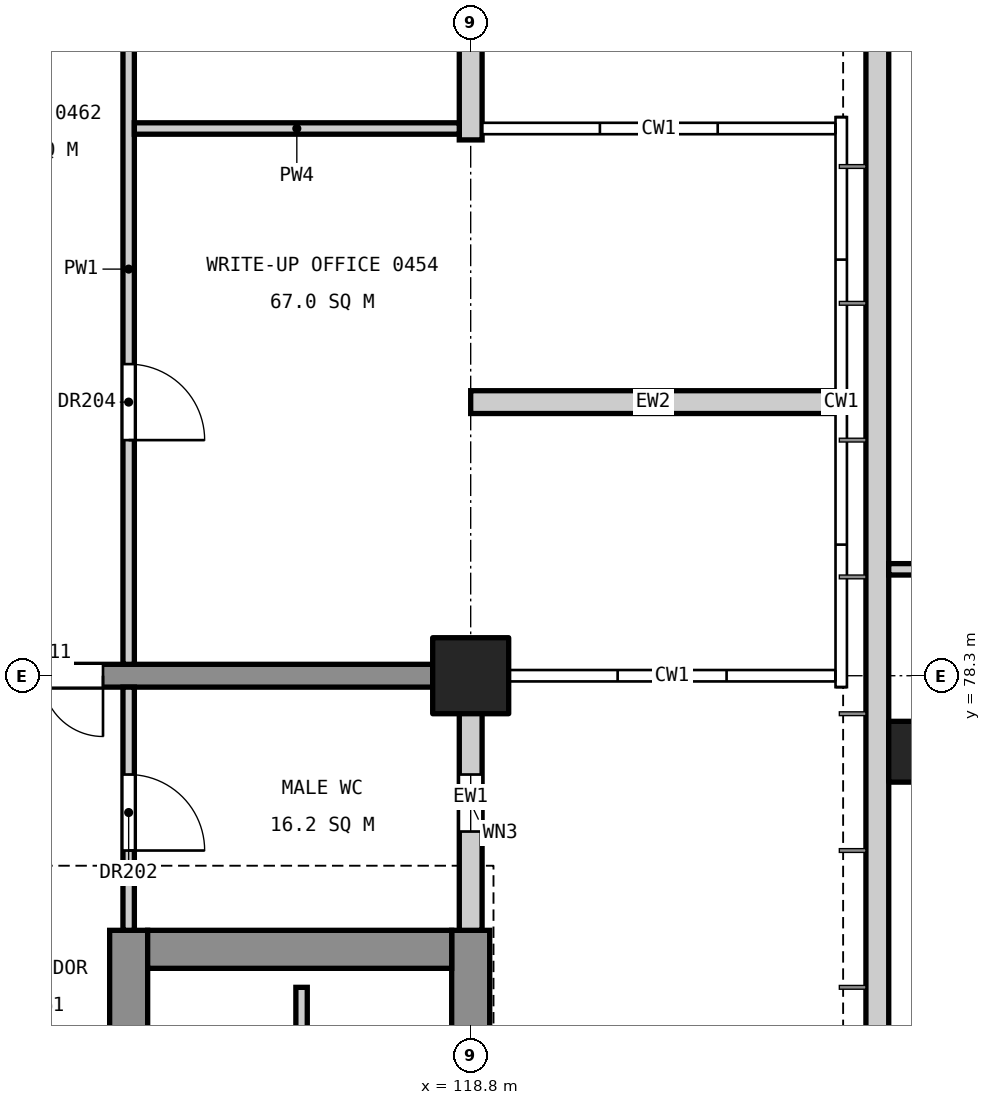
"""IFC4 building model, lengths in metres.
Left out: names, types, materials, properties, quantities, classifications, styles, units other than length and angle.
Written with IfcOpenShell. Run it as: python <this file> out.ifc"""

import sys

from ifc_helpers import new_model, si_unit, direction, frame, frame_2d, origin, origin_2d, place, context, subcontext, project, spatial, rectangle, extrude, element, fill, save


model = new_model("IFC4")
c1 = context("Model", 3, precision=1e-05, world=origin(), true_north=direction((0.0, 1.0)))
c2 = subcontext(c1, "Body", "Model", "MODEL_VIEW")
j1 = project(units=[si_unit("LENGTHUNIT", "METRE"), si_unit("PLANEANGLEUNIT", "RADIAN")], contexts=[c1])
p1 = place(None, origin())
s1 = spatial("IfcSite", under=j1, at=p1, CompositionType="ELEMENT")
p2 = place(p1, origin())
s2 = spatial("IfcBuilding", under=s1, at=p2, CompositionType="ELEMENT")
p3 = place(p2, frame((0.0, 0.0, 22.2)))
s3 = spatial("IfcBuildingStorey", under=s2, at=p3, CompositionType="ELEMENT", Elevation=22.2)
p4 = place(p3, frame((118.8, 78.3, 0.0), z_axis=(0.0, 0.0, 1.0), x_axis=(1.0, 0.0, 0.0)))
e1 = element("IfcColumn", 1, at=p4, inside=s3, PredefinedType="COLUMN", context=c2, shape_type="SweptSolid", body=[
    extrude(rectangle(XDim=1.0, YDim=1.0, at=origin_2d()), origin(), (0.0, 0.0, 1.0), 4.8),
])
p5 = place(p3, frame((118.8, 60.05, 0.0), z_axis=(0.0, 0.0, 1.0), x_axis=(0.0, 1.0, 0.0)))
e2 = element("IfcWall", 2, at=p5, inside=s3, PredefinedType="SHEAR", context=c2, shape_type="SweptSolid", body=[
    extrude(rectangle(XDim=14.9, YDim=0.5, at=frame_2d((7.45, 0.0))), origin(), (0.0, 0.0, 1.0), 4.55),
])
p6 = place(p5, frame((6.16, 0.0, 3.4)))
e3 = element("IfcOpeningElement", 3, at=p6, cuts=e2, PredefinedType="OPENING", context=c2, shape_type="SweptSolid", body=[
    extrude(rectangle(XDim=1.2, YDim=0.9, at=frame_2d((0.6, 0.45))), frame((0.0, 0.26, 0.0), z_axis=(0.0, -1.0, 0.0), x_axis=(1.0, 0.0, 0.0)), (0.0, 0.0, 1.0), 0.52),
])
p7 = place(p3, frame((114.3, 60.05, 0.0), z_axis=(0.0, 0.0, 1.0), x_axis=(0.0, 1.0, 0.0)))
e4 = element("IfcWall", 4, at=p7, inside=s3, PredefinedType="SHEAR", context=c2, shape_type="SweptSolid", body=[
    extrude(rectangle(XDim=14.9, YDim=0.5, at=frame_2d((7.45, 0.0))), origin(), (0.0, 0.0, 1.0), 4.55),
])
p8 = place(p7, frame((0.55, 0.0, 0.0)))
e5 = element("IfcOpeningElement", 5, at=p8, cuts=e4, PredefinedType="OPENING", context=c2, shape_type="SweptSolid", body=[
    extrude(rectangle(XDim=1.4, YDim=2.1, at=frame_2d((0.7, 1.05))), frame((0.0, 0.26, 0.0), z_axis=(0.0, -1.0, 0.0), x_axis=(1.0, 0.0, 0.0)), (0.0, 0.0, 1.0), 0.52),
])
p9 = place(p7, frame((8.85, 0.0, 0.0)))
e6 = element("IfcOpeningElement", 6, at=p9, cuts=e4, PredefinedType="OPENING", context=c2, shape_type="SweptSolid", body=[
    extrude(rectangle(XDim=1.1, YDim=2.1, at=frame_2d((0.55, 1.05))), frame((0.0, 0.26, 0.0), z_axis=(0.0, -1.0, 0.0), x_axis=(1.0, 0.0, 0.0)), (0.0, 0.0, 1.0), 0.52),
])
p10 = place(p7, frame((11.4, 0.0, 0.0)))
e7 = element("IfcOpeningElement", 7, at=p10, cuts=e4, PredefinedType="OPENING", context=c2, shape_type="SweptSolid", body=[
    extrude(rectangle(XDim=1.1, YDim=2.1, at=frame_2d((0.55, 1.05))), frame((0.0, 0.26, 0.0), z_axis=(0.0, -1.0, 0.0), x_axis=(1.0, 0.0, 0.0)), (0.0, 0.0, 1.0), 0.52),
])
p11 = place(p3, frame((118.55, 74.7, 0.0), z_axis=(0.0, 0.0, 1.0), x_axis=(-1.0, 0.0, 0.0)))
e8 = element("IfcWall", 8, at=p11, inside=s3, PredefinedType="SHEAR", context=c2, shape_type="SweptSolid", body=[
    extrude(rectangle(XDim=4.0, YDim=0.5, at=frame_2d((2.0, 0.0))), origin(), (0.0, 0.0, 1.0), 4.55),
])
p12 = place(p3, frame((118.3, 78.3, 0.0), z_axis=(0.0, 0.0, 1.0), x_axis=(-1.0, 0.0, 0.0)))
e9 = element("IfcWall", 9, at=p12, inside=s3, PredefinedType="SHEAR", context=c2, shape_type="SweptSolid", body=[
    extrude(rectangle(XDim=6.2, YDim=0.3, at=frame_2d((3.1, 0.0))), origin(), (0.0, 0.0, 1.0), 4.55),
])
p13 = place(p12, frame((4.337, 0.0, 0.0)))
e10 = element("IfcOpeningElement", 10, at=p13, cuts=e9, PredefinedType="OPENING", context=c2, shape_type="SweptSolid", body=[
    extrude(rectangle(XDim=1.6, YDim=2.1, at=frame_2d((0.8, 1.05))), frame((0.0, 0.16, 0.0), z_axis=(0.0, -1.0, 0.0), x_axis=(1.0, 0.0, 0.0)), (0.0, 0.0, 1.0), 0.32),
])
p14 = place(p3, frame((124.7, 77.3, 0.0), z_axis=(0.0, 0.0, 1.0), x_axis=(1.0, 0.0, 0.0)))
e11 = element("IfcColumn", 11, at=p14, inside=s3, PredefinedType="COLUMN", context=c2, shape_type="SweptSolid", body=[
    extrude(rectangle(XDim=0.8, YDim=0.8, at=origin_2d()), origin(), (0.0, 0.0, 1.0), 4.8),
])
p15 = place(p3, frame((124.15, 70.3, 0.0), z_axis=(0.0, 0.0, 1.0), x_axis=(0.0, 1.0, 0.0)))
e12 = element("IfcWall", 12, at=p15, inside=s3, PredefinedType="SOLIDWALL", context=c2, shape_type="SweptSolid", body=[
    extrude(rectangle(XDim=36.5, YDim=0.3, at=frame_2d((18.25, 0.0))), origin(), (0.0, 0.0, 1.0), 4.35),
])
p16 = place(p3, frame((124.3, 77.3, 0.0), z_axis=(0.0, 0.0, 1.0), x_axis=(1.0, 0.0, 0.0)))
e13 = element("IfcWall", 13, at=p16, inside=s3, PredefinedType="SOLIDWALL", context=c2, shape_type="SweptSolid", body=[
    extrude(rectangle(XDim=14.275, YDim=0.25, at=frame_2d((7.137, 0.0))), origin(), (0.0, 0.0, 1.0), 4.35),
])
p17 = place(p16, frame((2.55, 0.0, 0.0)))
e14 = element("IfcOpeningElement", 14, at=p17, cuts=e13, PredefinedType="OPENING", context=c2, shape_type="SweptSolid", body=[
    extrude(rectangle(XDim=0.9, YDim=2.1, at=frame_2d((0.45, 1.05))), frame((0.0, 0.135, 0.0), z_axis=(0.0, -1.0, 0.0), x_axis=(1.0, 0.0, 0.0)), (0.0, 0.0, 1.0), 0.27),
])
p18 = place(p16, frame((7.6, 0.0, 0.0)))
e15 = element("IfcOpeningElement", 15, at=p18, cuts=e13, PredefinedType="OPENING", context=c2, shape_type="SweptSolid", body=[
    extrude(rectangle(XDim=0.9, YDim=2.1, at=frame_2d((0.45, 1.05))), frame((0.0, 0.135, 0.0), z_axis=(0.0, -1.0, 0.0), x_axis=(1.0, 0.0, 0.0)), (0.0, 0.0, 1.0), 0.27),
])
p19 = place(p16, frame((11.65, 0.0, 0.0)))
e16 = element("IfcOpeningElement", 16, at=p19, cuts=e13, PredefinedType="OPENING", context=c2, shape_type="SweptSolid", body=[
    extrude(rectangle(XDim=1.2, YDim=2.1, at=frame_2d((0.6, 1.05))), frame((0.0, 0.135, 0.0), z_axis=(0.0, -1.0, 0.0), x_axis=(1.0, 0.0, 0.0)), (0.0, 0.0, 1.0), 0.27),
])
p20 = place(p3, frame((124.3, 79.7, 0.0), z_axis=(0.0, 0.0, 1.0), x_axis=(1.0, 0.0, 0.0)))
e17 = element("IfcWall", 17, at=p20, inside=s3, PredefinedType="SOLIDWALL", context=c2, shape_type="SweptSolid", body=[
    extrude(rectangle(XDim=13.025, YDim=0.15, at=frame_2d((6.512, 0.0))), origin(), (0.0, 0.0, 1.0), 4.35),
])
p21 = place(p3, frame((116.575, 73.3, 0.0), z_axis=(0.0, 0.0, 1.0), x_axis=(0.0, 1.0, 0.0)))
e18 = element("IfcWall", 18, at=p21, inside=s3, PredefinedType="SOLIDWALL", context=c2, shape_type="SweptSolid", body=[
    extrude(rectangle(XDim=0.9, YDim=0.15, at=frame_2d((0.45, 0.0))), origin(), (0.0, 0.0, 1.0), 4.8),
])
p22 = place(p3, frame((118.8, 74.95, 0.0), z_axis=(0.0, 0.0, 1.0), x_axis=(0.0, 1.0, 0.0)))
e19 = element("IfcWall", 19, at=p22, inside=s3, PredefinedType="STANDARD", context=c2, shape_type="SweptSolid", body=[
    extrude(rectangle(XDim=3.5, YDim=0.3, at=frame_2d((1.75, 0.0))), origin(), (0.0, 0.0, 1.0), 3.65),
])
p23 = place(p22, frame((1.3, 0.0, 0.8)))
e20 = element("IfcOpeningElement", 20, at=p23, cuts=e19, PredefinedType="OPENING", context=c2, shape_type="SweptSolid", body=[
    extrude(rectangle(XDim=0.75, YDim=1.2, at=frame_2d((0.375, 0.6))), frame((0.0, 0.16, 0.0), z_axis=(0.0, -1.0, 0.0), x_axis=(1.0, 0.0, 0.0)), (0.0, 0.0, 1.0), 0.32),
])
p24 = place(p3, frame((118.8, 85.35, 0.0), z_axis=(0.0, 0.0, 1.0), x_axis=(0.0, 1.0, 0.0)))
e21 = element("IfcWall", 21, at=p24, inside=s3, PredefinedType="STANDARD", context=c2, shape_type="SweptSolid", body=[
    extrude(rectangle(XDim=3.5, YDim=0.3, at=frame_2d((1.75, 0.0))), origin(), (0.0, 0.0, 1.0), 3.65),
])
p25 = place(p24, frame((1.45, 0.0, 0.8)))
e22 = element("IfcOpeningElement", 22, at=p25, cuts=e21, PredefinedType="OPENING", context=c2, shape_type="SweptSolid", body=[
    extrude(rectangle(XDim=0.75, YDim=1.2, at=frame_2d((0.375, 0.6))), frame((0.0, 0.16, 0.0), z_axis=(0.0, -1.0, 0.0), x_axis=(1.0, 0.0, 0.0)), (0.0, 0.0, 1.0), 0.32),
])
p26 = place(p3, frame((123.6, 81.9, 0.0), z_axis=(0.0, 0.0, 1.0), x_axis=(-1.0, 0.0, 0.0)))
e23 = element("IfcWall", 23, at=p26, inside=s3, PredefinedType="STANDARD", context=c2, shape_type="SweptSolid", body=[
    extrude(rectangle(XDim=4.8, YDim=0.3, at=frame_2d((2.4, 0.0))), origin(), (0.0, 0.0, 1.0), 3.65),
])
p27 = place(p3, frame((114.3, 74.95, 0.0), z_axis=(0.0, 0.0, 1.0), x_axis=(0.0, 1.0, 0.0)))
e24 = element("IfcWall", 24, at=p27, inside=s3, PredefinedType="PARTITIONING", context=c2, shape_type="SweptSolid", body=[
    extrude(rectangle(XDim=3.2, YDim=0.15, at=frame_2d((1.6, 0.0))), origin(), (0.0, 0.0, 1.0), 3.55),
])
p28 = place(p27, frame((1.05, 0.0, 0.0)))
e25 = element("IfcOpeningElement", 25, at=p28, cuts=e24, PredefinedType="OPENING", context=c2, shape_type="SweptSolid", body=[
    extrude(rectangle(XDim=1.0, YDim=2.1, at=frame_2d((0.5, 1.05))), frame((0.0, 0.085, 0.0), z_axis=(0.0, -1.0, 0.0), x_axis=(1.0, 0.0, 0.0)), (0.0, 0.0, 1.0), 0.17),
])
p29 = place(p3, frame((114.3, 78.45, 0.0), z_axis=(0.0, 0.0, 1.0), x_axis=(0.0, 1.0, 0.0)))
e26 = element("IfcWall", 26, at=p29, inside=s3, PredefinedType="PARTITIONING", context=c2, shape_type="SweptSolid", body=[
    extrude(rectangle(XDim=10.4, YDim=0.15, at=frame_2d((5.2, 0.0))), origin(), (0.0, 0.0, 1.0), 3.55),
])
p30 = place(p29, frame((8.35, 0.0, 0.0)))
e27 = element("IfcOpeningElement", 27, at=p30, cuts=e26, PredefinedType="OPENING", context=c2, shape_type="SweptSolid", body=[
    extrude(rectangle(XDim=1.0, YDim=2.1, at=frame_2d((0.5, 1.05))), frame((0.0, 0.085, 0.0), z_axis=(0.0, -1.0, 0.0), x_axis=(1.0, 0.0, 0.0)), (0.0, 0.0, 1.0), 0.17),
])
p31 = place(p29, frame((2.95, 0.0, 0.0)))
e28 = element("IfcOpeningElement", 28, at=p31, cuts=e26, PredefinedType="OPENING", context=c2, shape_type="SweptSolid", body=[
    extrude(rectangle(XDim=1.0, YDim=2.1, at=frame_2d((0.5, 1.05))), frame((0.0, 0.085, 0.0), z_axis=(0.0, -1.0, 0.0), x_axis=(1.0, 0.0, 0.0)), (0.0, 0.0, 1.0), 0.17),
])
p32 = place(p3, frame((118.65, 85.5, 0.0), z_axis=(0.0, 0.0, 1.0), x_axis=(-1.0, 0.0, 0.0)))
e29 = element("IfcWall", 29, at=p32, inside=s3, PredefinedType="PARTITIONING", context=c2, shape_type="SweptSolid", body=[
    extrude(rectangle(XDim=4.275, YDim=0.15, at=frame_2d((2.137, 0.0))), origin(), (0.0, 0.0, 1.0), 3.85),
])
p33 = place(p23, origin())
e30 = element("IfcWindow", 30, at=p33, inside=s3, PartitioningType="SINGLE_PANEL", PredefinedType="WINDOW", context=c2, shape_type="SweptSolid", body=[
    extrude(rectangle(XDim=0.75, YDim=1.2, at=frame_2d((0.375, 0.6))), frame((0.0, 0.03, 0.0), z_axis=(0.0, -1.0, 0.0), x_axis=(1.0, 0.0, 0.0)), (0.0, 0.0, 1.0), 0.06),
])
fill(e20, e30)
p34 = place(p28, frame((1.0, 0.0, 0.0), z_axis=(0.0, 0.0, 1.0), x_axis=(-1.0, 0.0, 0.0)))
e31 = element("IfcDoor", 31, at=p34, inside=s3, OperationType="SINGLE_SWING_RIGHT", PredefinedType="DOOR", context=c2, shape_type="SweptSolid", body=[
    extrude(rectangle(XDim=1.0, YDim=2.1, at=frame_2d((0.5, 1.05))), frame((0.0, 0.025, 0.0), z_axis=(0.0, -1.0, 0.0), x_axis=(1.0, 0.0, 0.0)), (0.0, 0.0, 1.0), 0.05),
])
fill(e25, e31)
p35 = place(p31, frame((1.0, 0.0, 0.0), z_axis=(0.0, 0.0, 1.0), x_axis=(-1.0, 0.0, 0.0)))
e32 = element("IfcDoor", 32, at=p35, inside=s3, OperationType="SINGLE_SWING_RIGHT", PredefinedType="DOOR", context=c2, shape_type="SweptSolid", body=[
    extrude(rectangle(XDim=1.0, YDim=2.1, at=frame_2d((0.5, 1.05))), frame((0.0, 0.025, 0.0), z_axis=(0.0, -1.0, 0.0), x_axis=(1.0, 0.0, 0.0)), (0.0, 0.0, 1.0), 0.05),
])
fill(e28, e32)
p36 = place(p13, origin())
e33 = element("IfcDoor", 33, at=p36, inside=s3, OperationType="DOUBLE_DOOR_SINGLE_SWING", PredefinedType="DOOR", context=c2, shape_type="SweptSolid", body=[
    extrude(rectangle(XDim=1.6, YDim=2.1, at=frame_2d((0.8, 1.05))), frame((0.0, 0.025, 0.0), z_axis=(0.0, -1.0, 0.0), x_axis=(1.0, 0.0, 0.0)), (0.0, 0.0, 1.0), 0.05),
])
fill(e10, e33)
save(model, sys.argv[1])
